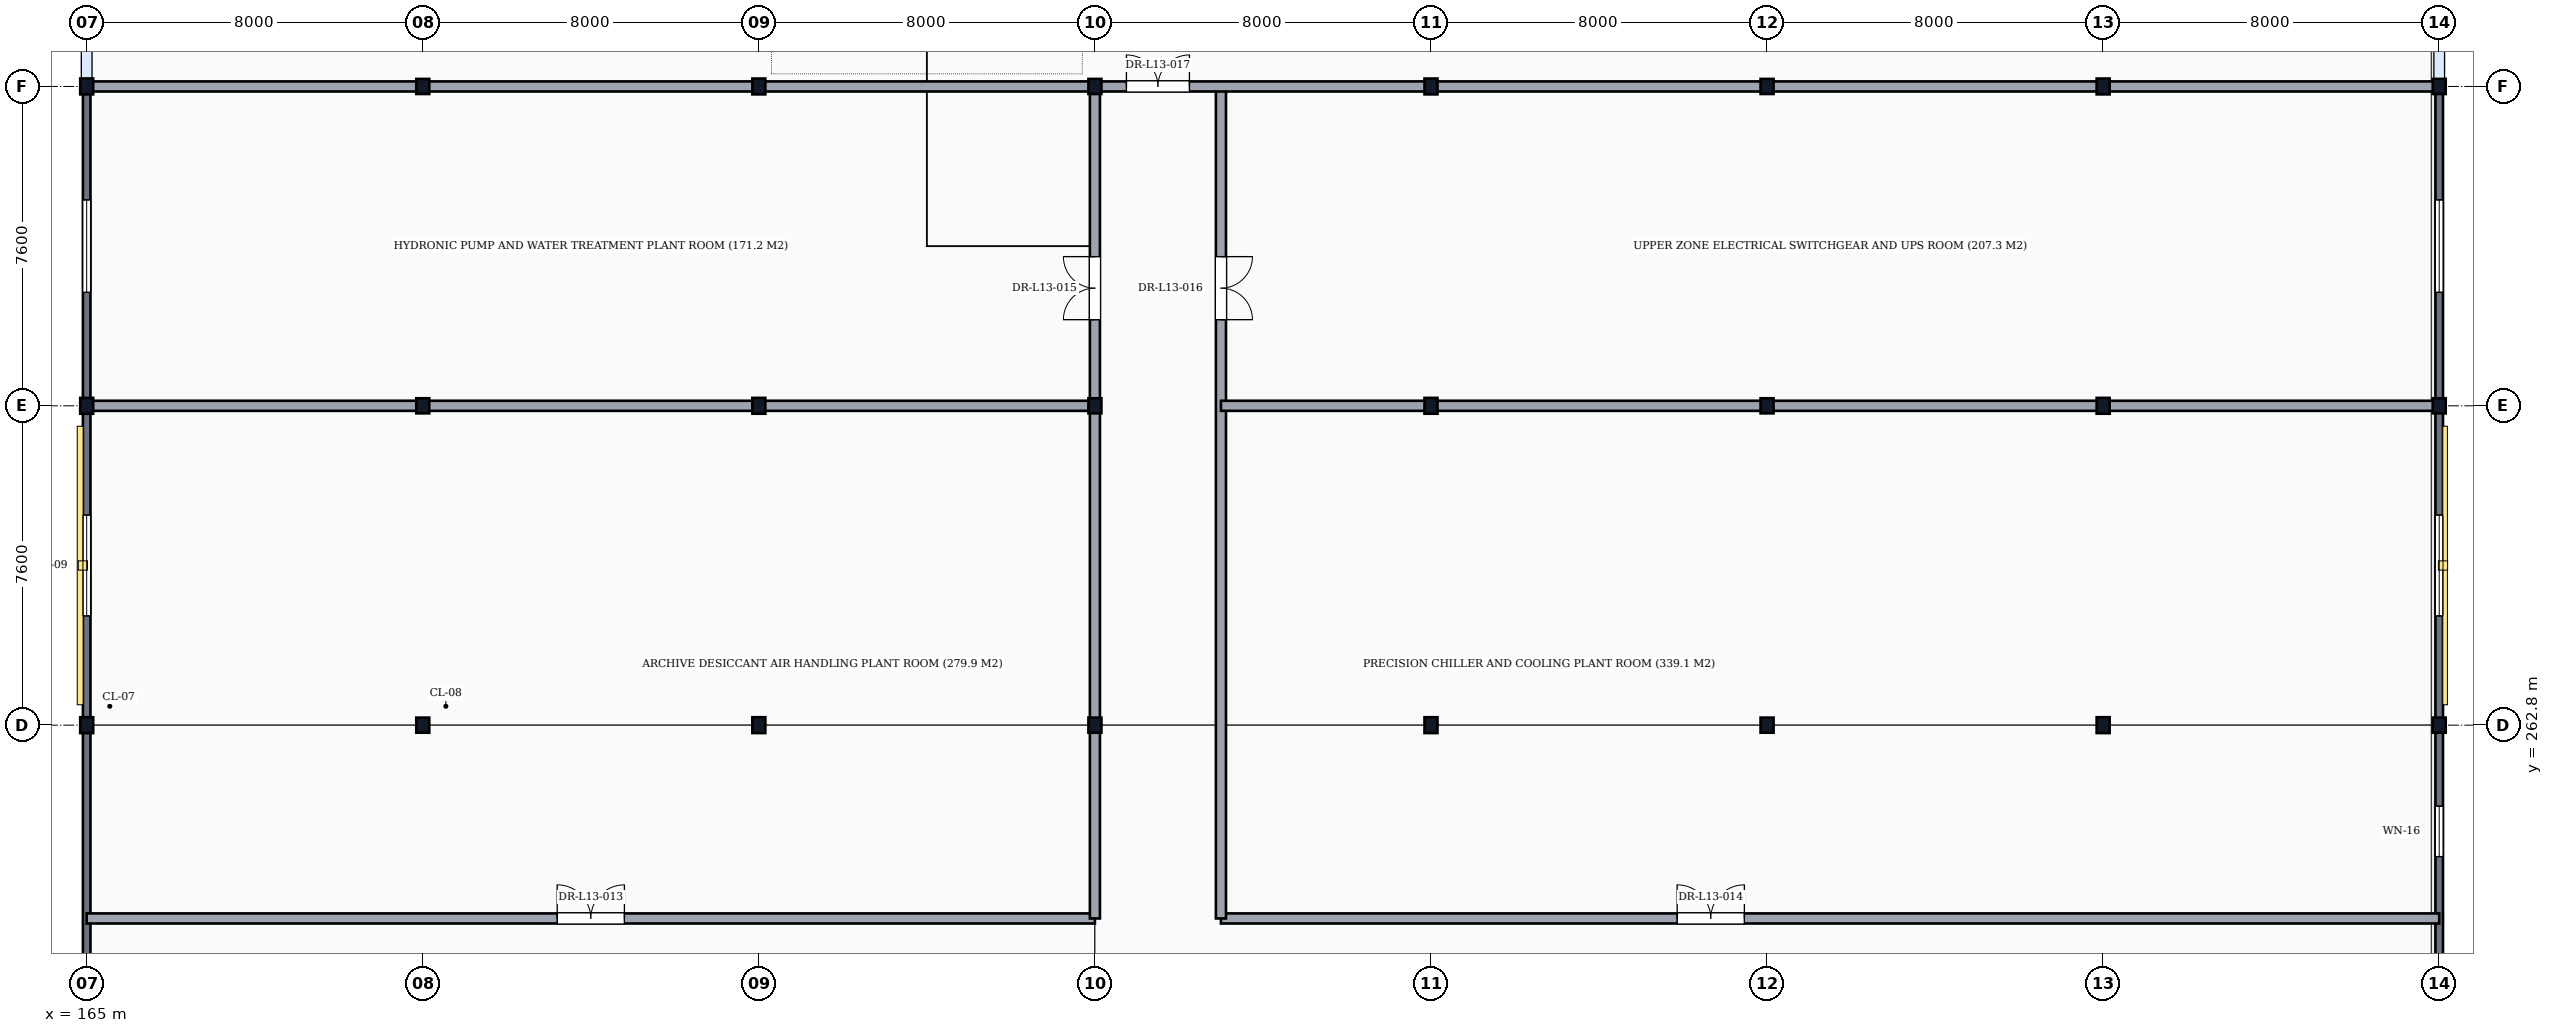
"""IFC4 building model, lengths in metres.
Left out: names, types, materials, properties, quantities, classifications, styles, units other than length and angle.
Written with IfcOpenShell. Run it as: python <this file> out.ifc"""

import sys

from ifc_helpers import new_model, si_unit, direction, frame, frame_2d, origin, origin_2d, place, context, subcontext, project, spatial, rectangle, i_section, extrude, element, fill, save


model = new_model("IFC4")
c1 = context("Model", 3, precision=1e-05, world=origin(), true_north=direction((0.0, 1.0)))
c2 = subcontext(c1, "Body", "Model", "MODEL_VIEW")
j1 = project(units=[si_unit("LENGTHUNIT", "METRE"), si_unit("PLANEANGLEUNIT", "RADIAN")], contexts=[c1])
p1 = place(None, origin())
s1 = spatial("IfcSite", under=j1, at=p1, CompositionType="ELEMENT")
p2 = place(p1, origin())
s2 = spatial("IfcBuilding", under=s1, at=p2, CompositionType="ELEMENT")
p3 = place(p2, frame((0.0, 0.0, 51.6)))
s3 = spatial("IfcBuildingStorey", under=s2, at=p3, CompositionType="ELEMENT", Elevation=51.6)
for number, where, z_axis, x_axis in (
    (1, (165.0, 262.8, 0.0), (0.0, 0.0, 1.0), (1.0, 0.0, 0.0)),
    (2, (165.0, 270.4, 0.0), (0.0, 0.0, 1.0), (1.0, 0.0, 0.0)),
    (3, (165.0, 278.0, 0.0), (0.0, 0.0, 1.0), (1.0, 0.0, 0.0)),
):
    element("IfcColumn", number, at=place(p3, frame(where, z_axis=z_axis, x_axis=x_axis)), inside=s3, PredefinedType="COLUMN", context=c2, shape_type="SweptSolid", body=[
        extrude(i_section(OverallWidth=0.309, OverallDepth=0.377, WebThickness=0.021, FlangeThickness=0.04, FilletRadius=0.027, at=origin_2d()), origin(), (0.0, 0.0, 1.0), 4.5),
    ])
for number, where, z_axis, x_axis in (
    (4, (173.0, 262.8, 0.0), (0.0, 0.0, 1.0), (1.0, 0.0, 0.0)),
    (5, (173.0, 270.4, 0.0), (0.0, 0.0, 1.0), (1.0, 0.0, 0.0)),
    (6, (173.0, 278.0, 0.0), (0.0, 0.0, 1.0), (1.0, 0.0, 0.0)),
):
    element("IfcColumn", number, at=place(p3, frame(where, z_axis=z_axis, x_axis=x_axis)), inside=s3, PredefinedType="COLUMN", context=c2, shape_type="SweptSolid", body=[
        extrude(i_section(OverallWidth=0.309, OverallDepth=0.359, WebThickness=0.021, FlangeThickness=0.04, FilletRadius=0.027, at=origin_2d()), origin(), (0.0, 0.0, 1.0), 4.5),
    ])
for number, where, z_axis, x_axis in (
    (7, (181.0, 262.8, 0.0), (0.0, 0.0, 1.0), (1.0, 0.0, 0.0)),
    (8, (181.0, 270.4, 0.0), (0.0, 0.0, 1.0), (1.0, 0.0, 0.0)),
    (9, (181.0, 278.0, 0.0), (0.0, 0.0, 1.0), (1.0, 0.0, 0.0)),
):
    element("IfcColumn", number, at=place(p3, frame(where, z_axis=z_axis, x_axis=x_axis)), inside=s3, PredefinedType="COLUMN", context=c2, shape_type="SweptSolid", body=[
        extrude(i_section(OverallWidth=0.309, OverallDepth=0.377, WebThickness=0.021, FlangeThickness=0.04, FilletRadius=0.027, at=origin_2d()), origin(), (0.0, 0.0, 1.0), 4.5),
    ])
for number, where, z_axis, x_axis in (
    (10, (189.0, 262.8, 0.0), (0.0, 0.0, 1.0), (1.0, 0.0, 0.0)),
    (11, (189.0, 270.4, 0.0), (0.0, 0.0, 1.0), (1.0, 0.0, 0.0)),
    (12, (189.0, 278.0, 0.0), (0.0, 0.0, 1.0), (1.0, 0.0, 0.0)),
):
    element("IfcColumn", number, at=place(p3, frame(where, z_axis=z_axis, x_axis=x_axis)), inside=s3, PredefinedType="COLUMN", context=c2, shape_type="SweptSolid", body=[
        extrude(i_section(OverallWidth=0.309, OverallDepth=0.359, WebThickness=0.021, FlangeThickness=0.04, FilletRadius=0.027, at=origin_2d()), origin(), (0.0, 0.0, 1.0), 4.5),
    ])
for number, where, z_axis, x_axis in (
    (13, (197.0, 262.8, 0.0), (0.0, 0.0, 1.0), (1.0, 0.0, 0.0)),
    (14, (197.0, 270.4, 0.0), (0.0, 0.0, 1.0), (1.0, 0.0, 0.0)),
    (15, (197.0, 278.0, 0.0), (0.0, 0.0, 1.0), (1.0, 0.0, 0.0)),
):
    element("IfcColumn", number, at=place(p3, frame(where, z_axis=z_axis, x_axis=x_axis)), inside=s3, PredefinedType="COLUMN", context=c2, shape_type="SweptSolid", body=[
        extrude(i_section(OverallWidth=0.309, OverallDepth=0.377, WebThickness=0.021, FlangeThickness=0.04, FilletRadius=0.027, at=origin_2d()), origin(), (0.0, 0.0, 1.0), 4.5),
    ])
for number, where, z_axis, x_axis in (
    (16, (205.0, 262.8, 0.0), (0.0, 0.0, 1.0), (1.0, 0.0, 0.0)),
    (17, (205.0, 270.4, 0.0), (0.0, 0.0, 1.0), (1.0, 0.0, 0.0)),
    (18, (205.0, 278.0, 0.0), (0.0, 0.0, 1.0), (1.0, 0.0, 0.0)),
):
    element("IfcColumn", number, at=place(p3, frame(where, z_axis=z_axis, x_axis=x_axis)), inside=s3, PredefinedType="COLUMN", context=c2, shape_type="SweptSolid", body=[
        extrude(i_section(OverallWidth=0.309, OverallDepth=0.359, WebThickness=0.021, FlangeThickness=0.04, FilletRadius=0.027, at=origin_2d()), origin(), (0.0, 0.0, 1.0), 4.5),
    ])
for number, where, z_axis, x_axis in (
    (19, (213.0, 262.8, 0.0), (0.0, 0.0, 1.0), (1.0, 0.0, 0.0)),
    (20, (213.0, 270.4, 0.0), (0.0, 0.0, 1.0), (1.0, 0.0, 0.0)),
    (21, (213.0, 278.0, 0.0), (0.0, 0.0, 1.0), (1.0, 0.0, 0.0)),
):
    element("IfcColumn", number, at=place(p3, frame(where, z_axis=z_axis, x_axis=x_axis)), inside=s3, PredefinedType="COLUMN", context=c2, shape_type="SweptSolid", body=[
        extrude(i_section(OverallWidth=0.309, OverallDepth=0.377, WebThickness=0.021, FlangeThickness=0.04, FilletRadius=0.027, at=origin_2d()), origin(), (0.0, 0.0, 1.0), 4.5),
    ])
for number, where, z_axis, x_axis in (
    (22, (221.0, 262.8, 0.0), (0.0, 0.0, 1.0), (1.0, 0.0, 0.0)),
    (23, (221.0, 270.4, 0.0), (0.0, 0.0, 1.0), (1.0, 0.0, 0.0)),
    (24, (221.0, 278.0, 0.0), (0.0, 0.0, 1.0), (1.0, 0.0, 0.0)),
):
    element("IfcColumn", number, at=place(p3, frame(where, z_axis=z_axis, x_axis=x_axis)), inside=s3, PredefinedType="COLUMN", context=c2, shape_type="SweptSolid", body=[
        extrude(i_section(OverallWidth=0.309, OverallDepth=0.359, WebThickness=0.021, FlangeThickness=0.04, FilletRadius=0.027, at=origin_2d()), origin(), (0.0, 0.0, 1.0), 4.5),
    ])
p4 = place(p3, frame((165.0, 255.206, 0.0), z_axis=(0.0, 0.0, 1.0), x_axis=(0.0, 1.0, 0.0)))
e25 = element("IfcWall", 25, at=p4, inside=s3, PredefinedType="SOLIDWALL", context=c2, shape_type="SweptSolid", body=[
    extrude(rectangle(XDim=7.588, YDim=0.18, at=frame_2d((3.794, 0.0))), origin(), (0.0, 0.0, 1.0), 3.908),
])
p5 = place(p3, frame((165.0, 262.806, 0.0), z_axis=(0.0, 0.0, 1.0), x_axis=(0.0, 1.0, 0.0)))
e26 = element("IfcWall", 26, at=p5, inside=s3, PredefinedType="SOLIDWALL", context=c2, shape_type="SweptSolid", body=[
    extrude(rectangle(XDim=7.588, YDim=0.18, at=frame_2d((3.794, 0.0))), origin(), (0.0, 0.0, 1.0), 3.908),
])
p6 = place(p5, frame((2.594, 0.0, 0.95)))
e27 = element("IfcOpeningElement", 27, at=p6, cuts=e26, PredefinedType="OPENING", context=c2, shape_type="SweptSolid", body=[
    extrude(rectangle(XDim=2.4, YDim=2.2, at=frame_2d((1.2, 1.1))), frame((0.0, 0.105, 0.0), z_axis=(0.0, -1.0, 0.0), x_axis=(1.0, 0.0, 0.0)), (0.0, 0.0, 1.0), 0.21),
])
p7 = place(p3, frame((165.0, 270.406, 0.0), z_axis=(0.0, 0.0, 1.0), x_axis=(0.0, 1.0, 0.0)))
e28 = element("IfcWall", 28, at=p7, inside=s3, PredefinedType="SOLIDWALL", context=c2, shape_type="SweptSolid", body=[
    extrude(rectangle(XDim=7.588, YDim=0.18, at=frame_2d((3.794, 0.0))), origin(), (0.0, 0.0, 1.0), 3.908),
])
p8 = place(p7, frame((2.694, 0.0, 0.95)))
e29 = element("IfcOpeningElement", 29, at=p8, cuts=e28, PredefinedType="OPENING", context=c2, shape_type="SweptSolid", body=[
    extrude(rectangle(XDim=2.2, YDim=2.1, at=frame_2d((1.1, 1.05))), frame((0.0, 0.105, 0.0), z_axis=(0.0, -1.0, 0.0), x_axis=(1.0, 0.0, 0.0)), (0.0, 0.0, 1.0), 0.21),
])
p9 = place(p3, frame((221.0, 255.206, 0.0), z_axis=(0.0, 0.0, 1.0), x_axis=(0.0, 1.0, 0.0)))
e30 = element("IfcWall", 30, at=p9, inside=s3, PredefinedType="SOLIDWALL", context=c2, shape_type="SweptSolid", body=[
    extrude(rectangle(XDim=7.588, YDim=0.18, at=frame_2d((3.794, 0.0))), origin(), (0.0, 0.0, 1.0), 3.978),
])
p10 = place(p9, frame((4.466, 0.0, 0.95)))
e31 = element("IfcOpeningElement", 31, at=p10, cuts=e30, PredefinedType="OPENING", context=c2, shape_type="SweptSolid", body=[
    extrude(rectangle(XDim=1.2, YDim=1.8, at=frame_2d((0.6, 0.9))), frame((0.0, 0.105, 0.0), z_axis=(0.0, -1.0, 0.0), x_axis=(1.0, 0.0, 0.0)), (0.0, 0.0, 1.0), 0.21),
])
p11 = place(p3, frame((221.0, 262.806, 0.0), z_axis=(0.0, 0.0, 1.0), x_axis=(0.0, 1.0, 0.0)))
e32 = element("IfcWall", 32, at=p11, inside=s3, PredefinedType="SOLIDWALL", context=c2, shape_type="SweptSolid", body=[
    extrude(rectangle(XDim=7.588, YDim=0.18, at=frame_2d((3.794, 0.0))), origin(), (0.0, 0.0, 1.0), 3.978),
])
p12 = place(p11, frame((2.594, 0.0, 0.95)))
e33 = element("IfcOpeningElement", 33, at=p12, cuts=e32, PredefinedType="OPENING", context=c2, shape_type="SweptSolid", body=[
    extrude(rectangle(XDim=2.4, YDim=2.2, at=frame_2d((1.2, 1.1))), frame((0.0, 0.105, 0.0), z_axis=(0.0, -1.0, 0.0), x_axis=(1.0, 0.0, 0.0)), (0.0, 0.0, 1.0), 0.21),
])
p13 = place(p3, frame((221.0, 270.406, 0.0), z_axis=(0.0, 0.0, 1.0), x_axis=(0.0, 1.0, 0.0)))
e34 = element("IfcWall", 34, at=p13, inside=s3, PredefinedType="SOLIDWALL", context=c2, shape_type="SweptSolid", body=[
    extrude(rectangle(XDim=7.588, YDim=0.18, at=frame_2d((3.794, 0.0))), origin(), (0.0, 0.0, 1.0), 3.978),
])
p14 = place(p13, frame((2.694, 0.0, 0.95)))
e35 = element("IfcOpeningElement", 35, at=p14, cuts=e34, PredefinedType="OPENING", context=c2, shape_type="SweptSolid", body=[
    extrude(rectangle(XDim=2.2, YDim=2.1, at=frame_2d((1.1, 1.05))), frame((0.0, 0.105, 0.0), z_axis=(0.0, -1.0, 0.0), x_axis=(1.0, 0.0, 0.0)), (0.0, 0.0, 1.0), 0.21),
])
p15 = place(p3, frame((220.9, 248.6, 4.5), z_axis=(0.0, 0.0, 1.0), x_axis=(0.0, 1.0, 0.0)))
e36 = element("IfcWall", 36, at=p15, inside=s3, PredefinedType="PARAPET", context=c2, shape_type="SweptSolid", body=[
    extrude(rectangle(XDim=36.8, YDim=0.18, at=frame_2d((18.4, 0.0))), origin(), (0.0, 0.0, 1.0), 1.2),
])
p16 = place(p3, frame((165.0, 258.2, 0.0), z_axis=(0.0, 0.0, 1.0), x_axis=(1.0, 0.0, 0.0)))
e37 = element("IfcWall", 37, at=p16, inside=s3, PredefinedType="PARTITIONING", context=c2, shape_type="SweptSolid", body=[
    extrude(rectangle(XDim=24.0, YDim=0.24, at=frame_2d((12.0, 0.0))), origin(), (0.0, 0.0, 1.0), 4.18),
])
p17 = place(p16, frame((11.2, 0.0, 0.0)))
e38 = element("IfcOpeningElement", 38, at=p17, cuts=e37, PredefinedType="OPENING", context=c2, shape_type="SweptSolid", body=[
    extrude(rectangle(XDim=1.6, YDim=2.1, at=frame_2d((0.8, 1.05))), frame((0.0, 0.135, 0.0), z_axis=(0.0, -1.0, 0.0), x_axis=(1.0, 0.0, 0.0)), (0.0, 0.0, 1.0), 0.27),
])
p18 = place(p3, frame((192.0, 258.2, 0.0), z_axis=(0.0, 0.0, 1.0), x_axis=(1.0, 0.0, 0.0)))
e39 = element("IfcWall", 39, at=p18, inside=s3, PredefinedType="PARTITIONING", context=c2, shape_type="SweptSolid", body=[
    extrude(rectangle(XDim=29.0, YDim=0.24, at=frame_2d((14.5, 0.0))), origin(), (0.0, 0.0, 1.0), 4.18),
])
p19 = place(p18, frame((10.86, 0.0, 0.0)))
e40 = element("IfcOpeningElement", 40, at=p19, cuts=e39, PredefinedType="OPENING", context=c2, shape_type="SweptSolid", body=[
    extrude(rectangle(XDim=1.6, YDim=2.1, at=frame_2d((0.8, 1.05))), frame((0.0, 0.135, 0.0), z_axis=(0.0, -1.0, 0.0), x_axis=(1.0, 0.0, 0.0)), (0.0, 0.0, 1.0), 0.27),
])
p20 = place(p3, frame((189.0, 258.2, 0.0), z_axis=(0.0, 0.0, 1.0), x_axis=(0.0, 1.0, 0.0)))
e41 = element("IfcWall", 41, at=p20, inside=s3, PredefinedType="PARTITIONING", context=c2, shape_type="SweptSolid", body=[
    extrude(rectangle(XDim=19.8, YDim=0.24, at=frame_2d((9.9, 0.0))), origin(), (0.0, 0.0, 1.0), 3.778),
])
p21 = place(p20, frame((14.25, 0.0, 0.0)))
e42 = element("IfcOpeningElement", 42, at=p21, cuts=e41, PredefinedType="OPENING", context=c2, shape_type="SweptSolid", body=[
    extrude(rectangle(XDim=1.5, YDim=2.1, at=frame_2d((0.75, 1.05))), frame((0.0, 0.135, 0.0), z_axis=(0.0, -1.0, 0.0), x_axis=(1.0, 0.0, 0.0)), (0.0, 0.0, 1.0), 0.27),
])
p22 = place(p3, frame((192.0, 258.2, 0.0), z_axis=(0.0, 0.0, 1.0), x_axis=(0.0, 1.0, 0.0)))
e43 = element("IfcWall", 43, at=p22, inside=s3, PredefinedType="PARTITIONING", context=c2, shape_type="SweptSolid", body=[
    extrude(rectangle(XDim=19.8, YDim=0.24, at=frame_2d((9.9, 0.0))), origin(), (0.0, 0.0, 1.0), 4.18),
])
p23 = place(p22, frame((14.25, 0.0, 0.0)))
e44 = element("IfcOpeningElement", 44, at=p23, cuts=e43, PredefinedType="OPENING", context=c2, shape_type="SweptSolid", body=[
    extrude(rectangle(XDim=1.5, YDim=2.1, at=frame_2d((0.75, 1.05))), frame((0.0, 0.135, 0.0), z_axis=(0.0, -1.0, 0.0), x_axis=(1.0, 0.0, 0.0)), (0.0, 0.0, 1.0), 0.27),
])
p24 = place(p3, frame((165.0, 270.4, 0.0), z_axis=(0.0, 0.0, 1.0), x_axis=(1.0, 0.0, 0.0)))
e45 = element("IfcWall", 45, at=p24, inside=s3, PredefinedType="PARTITIONING", context=c2, shape_type="SweptSolid", body=[
    extrude(rectangle(XDim=24.0, YDim=0.24, at=frame_2d((12.0, 0.0))), origin(), (0.0, 0.0, 1.0), 3.678),
])
p25 = place(p3, frame((192.0, 270.4, 0.0), z_axis=(0.0, 0.0, 1.0), x_axis=(1.0, 0.0, 0.0)))
e46 = element("IfcWall", 46, at=p25, inside=s3, PredefinedType="PARTITIONING", context=c2, shape_type="SweptSolid", body=[
    extrude(rectangle(XDim=29.0, YDim=0.24, at=frame_2d((14.5, 0.0))), origin(), (0.0, 0.0, 1.0), 3.678),
])
p26 = place(p3, frame((165.0, 278.0, 0.0), z_axis=(0.0, 0.0, 1.0), x_axis=(1.0, 0.0, 0.0)))
e47 = element("IfcWall", 47, at=p26, inside=s3, PredefinedType="PARTITIONING", context=c2, shape_type="SweptSolid", body=[
    extrude(rectangle(XDim=56.0, YDim=0.24, at=frame_2d((28.0, 0.0))), origin(), (0.0, 0.0, 1.0), 3.678),
])
p27 = place(p26, frame((24.75, 0.0, 0.0)))
e48 = element("IfcOpeningElement", 48, at=p27, cuts=e47, PredefinedType="OPENING", context=c2, shape_type="SweptSolid", body=[
    extrude(rectangle(XDim=1.5, YDim=2.25, at=frame_2d((0.75, 1.125))), frame((0.0, 0.135, 0.0), z_axis=(0.0, -1.0, 0.0), x_axis=(1.0, 0.0, 0.0)), (0.0, 0.0, 1.0), 0.27),
])
p28 = place(p6, origin())
e49 = element("IfcWindow", 49, at=p28, inside=s3, PartitioningType="DOUBLE_PANEL_VERTICAL", PredefinedType="WINDOW", context=c2, shape_type="SweptSolid", body=[
    extrude(rectangle(XDim=2.4, YDim=2.2, at=frame_2d((1.2, 1.1))), frame((0.0, 0.03, 0.0), z_axis=(0.0, -1.0, 0.0), x_axis=(1.0, 0.0, 0.0)), (0.0, 0.0, 1.0), 0.06),
])
fill(e27, e49)
p29 = place(p8, origin())
e50 = element("IfcWindow", 50, at=p29, inside=s3, PartitioningType="DOUBLE_PANEL_VERTICAL", PredefinedType="WINDOW", context=c2, shape_type="SweptSolid", body=[
    extrude(rectangle(XDim=2.2, YDim=2.1, at=frame_2d((1.1, 1.05))), frame((0.0, 0.03, 0.0), z_axis=(0.0, -1.0, 0.0), x_axis=(1.0, 0.0, 0.0)), (0.0, 0.0, 1.0), 0.06),
])
fill(e29, e50)
p30 = place(p10, origin())
e51 = element("IfcWindow", 51, at=p30, inside=s3, PartitioningType="SINGLE_PANEL", PredefinedType="WINDOW", context=c2, shape_type="SweptSolid", body=[
    extrude(rectangle(XDim=1.2, YDim=1.8, at=frame_2d((0.6, 0.9))), frame((0.0, 0.03, 0.0), z_axis=(0.0, -1.0, 0.0), x_axis=(1.0, 0.0, 0.0)), (0.0, 0.0, 1.0), 0.06),
])
fill(e31, e51)
p31 = place(p12, origin())
e52 = element("IfcWindow", 52, at=p31, inside=s3, PartitioningType="DOUBLE_PANEL_VERTICAL", PredefinedType="WINDOW", context=c2, shape_type="SweptSolid", body=[
    extrude(rectangle(XDim=2.4, YDim=2.2, at=frame_2d((1.2, 1.1))), frame((0.0, 0.03, 0.0), z_axis=(0.0, -1.0, 0.0), x_axis=(1.0, 0.0, 0.0)), (0.0, 0.0, 1.0), 0.06),
])
fill(e33, e52)
p32 = place(p14, origin())
e53 = element("IfcWindow", 53, at=p32, inside=s3, PartitioningType="DOUBLE_PANEL_VERTICAL", PredefinedType="WINDOW", context=c2, shape_type="SweptSolid", body=[
    extrude(rectangle(XDim=2.2, YDim=2.1, at=frame_2d((1.1, 1.05))), frame((0.0, 0.03, 0.0), z_axis=(0.0, -1.0, 0.0), x_axis=(1.0, 0.0, 0.0)), (0.0, 0.0, 1.0), 0.06),
])
fill(e35, e53)
p33 = place(p17, origin())
e54 = element("IfcDoor", 54, at=p33, inside=s3, OperationType="DOUBLE_DOOR_SINGLE_SWING", PredefinedType="DOOR", context=c2, shape_type="SweptSolid", body=[
    extrude(rectangle(XDim=1.6, YDim=2.1, at=frame_2d((0.8, 1.05))), frame((0.0, 0.025, 0.0), z_axis=(0.0, -1.0, 0.0), x_axis=(1.0, 0.0, 0.0)), (0.0, 0.0, 1.0), 0.05),
])
fill(e38, e54)
p34 = place(p19, origin())
e55 = element("IfcDoor", 55, at=p34, inside=s3, OperationType="DOUBLE_DOOR_SINGLE_SWING", PredefinedType="DOOR", context=c2, shape_type="SweptSolid", body=[
    extrude(rectangle(XDim=1.6, YDim=2.1, at=frame_2d((0.8, 1.05))), frame((0.0, 0.025, 0.0), z_axis=(0.0, -1.0, 0.0), x_axis=(1.0, 0.0, 0.0)), (0.0, 0.0, 1.0), 0.05),
])
fill(e40, e55)
p35 = place(p21, origin())
e56 = element("IfcDoor", 56, at=p35, inside=s3, OperationType="DOUBLE_DOOR_SINGLE_SWING", PredefinedType="DOOR", context=c2, shape_type="SweptSolid", body=[
    extrude(rectangle(XDim=1.5, YDim=2.1, at=frame_2d((0.75, 1.05))), frame((0.0, 0.025, 0.0), z_axis=(0.0, -1.0, 0.0), x_axis=(1.0, 0.0, 0.0)), (0.0, 0.0, 1.0), 0.05),
])
fill(e42, e56)
p36 = place(p23, frame((1.5, 0.0, 0.0), z_axis=(0.0, 0.0, 1.0), x_axis=(-1.0, 0.0, 0.0)))
e57 = element("IfcDoor", 57, at=p36, inside=s3, OperationType="DOUBLE_DOOR_SINGLE_SWING", PredefinedType="DOOR", context=c2, shape_type="SweptSolid", body=[
    extrude(rectangle(XDim=1.5, YDim=2.1, at=frame_2d((0.75, 1.05))), frame((0.0, 0.025, 0.0), z_axis=(0.0, -1.0, 0.0), x_axis=(1.0, 0.0, 0.0)), (0.0, 0.0, 1.0), 0.05),
])
fill(e44, e57)
p37 = place(p27, origin())
e58 = element("IfcDoor", 58, at=p37, inside=s3, OperationType="DOUBLE_DOOR_SINGLE_SWING", PredefinedType="DOOR", context=c2, shape_type="SweptSolid", body=[
    extrude(rectangle(XDim=1.5, YDim=2.25, at=frame_2d((0.75, 1.125))), frame((0.0, 0.025, 0.0), z_axis=(0.0, -1.0, 0.0), x_axis=(1.0, 0.0, 0.0)), (0.0, 0.0, 1.0), 0.05),
])
fill(e48, e58)
save(model, sys.argv[1])
